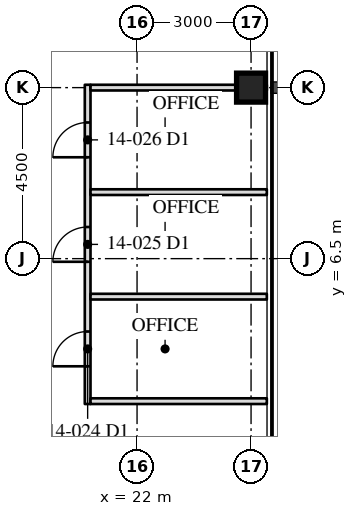
"""IFC4 building model, lengths in metres.
Left out: names, types, materials, properties, quantities, classifications, styles, units other than length and angle.
Written with IfcOpenShell. Run it as: python <this file> out.ifc"""

import sys

from ifc_helpers import new_model, si_unit, direction, frame, frame_2d, origin, origin_2d, place, context, subcontext, project, spatial, rectangle, hollow_rectangle, extrude, element, fill, save


model = new_model("IFC4")
c1 = context("Model", 3, precision=1e-05, world=origin(), true_north=direction((0.0, 1.0)))
c2 = subcontext(c1, "Body", "Model", "MODEL_VIEW")
j1 = project(units=[si_unit("LENGTHUNIT", "METRE"), si_unit("PLANEANGLEUNIT", "RADIAN")], contexts=[c1])
p1 = place(None, origin())
s1 = spatial("IfcSite", under=j1, at=p1, CompositionType="ELEMENT")
p2 = place(p1, origin())
s2 = spatial("IfcBuilding", under=s1, at=p2, CompositionType="ELEMENT")
p3 = place(p2, frame((0.0, 0.0, 61.1)))
s3 = spatial("IfcBuildingStorey", under=s2, at=p3, CompositionType="ELEMENT", Elevation=61.1)
p4 = place(p3, frame((25.0, 11.0, 0.0), z_axis=(0.0, 0.0, 1.0), x_axis=(0.0, 1.0, 0.0)))
e1 = element("IfcColumn", 1, at=p4, inside=s3, PredefinedType="COLUMN", context=c2, shape_type="SweptSolid", body=[
    extrude(hollow_rectangle(XDim=0.762, YDim=0.762, WallThickness=0.127, at=origin_2d()), origin(), (0.0, 0.0, 1.0), 4.1),
])
p5 = place(p3, frame((20.7, 2.675, 0.0), z_axis=(0.0, 0.0, 1.0), x_axis=(0.0, 1.0, 0.0)))
e2 = element("IfcWall", 2, at=p5, inside=s3, PredefinedType="PARTITIONING", context=c2, shape_type="SweptSolid", body=[
    extrude(rectangle(XDim=8.4, YDim=0.15, at=frame_2d((4.2, 0.0))), origin(), (0.0, 0.0, 1.0), 3.91),
])
p6 = place(p5, frame((0.992, 0.0, 0.0)))
e3 = element("IfcOpeningElement", 3, at=p6, cuts=e2, PredefinedType="OPENING", context=c2, shape_type="SweptSolid", body=[
    extrude(rectangle(XDim=0.915, YDim=2.134, at=frame_2d((0.458, 1.067))), frame((0.0, 0.085, 0.0), z_axis=(0.0, -1.0, 0.0), x_axis=(1.0, 0.0, 0.0)), (0.0, 0.0, 1.0), 0.17),
])
p7 = place(p5, frame((3.742, 0.0, 0.0)))
e4 = element("IfcOpeningElement", 4, at=p7, cuts=e2, PredefinedType="OPENING", context=c2, shape_type="SweptSolid", body=[
    extrude(rectangle(XDim=0.915, YDim=2.134, at=frame_2d((0.458, 1.067))), frame((0.0, 0.085, 0.0), z_axis=(0.0, -1.0, 0.0), x_axis=(1.0, 0.0, 0.0)), (0.0, 0.0, 1.0), 0.17),
])
p8 = place(p5, frame((6.492, 0.0, 0.0)))
e5 = element("IfcOpeningElement", 5, at=p8, cuts=e2, PredefinedType="OPENING", context=c2, shape_type="SweptSolid", body=[
    extrude(rectangle(XDim=0.915, YDim=2.134, at=frame_2d((0.458, 1.067))), frame((0.0, 0.085, 0.0), z_axis=(0.0, -1.0, 0.0), x_axis=(1.0, 0.0, 0.0)), (0.0, 0.0, 1.0), 0.17),
])
for number, where, z_axis, x_axis in (
    (6, (20.775, 2.75, 0.0), (0.0, 0.0, 1.0), (1.0, 0.0, 0.0)),
    (7, (20.775, 5.5, 0.0), (0.0, 0.0, 1.0), (1.0, 0.0, 0.0)),
    (8, (20.775, 8.25, 0.0), (0.0, 0.0, 1.0), (1.0, 0.0, 0.0)),
):
    element("IfcWall", number, at=place(p3, frame(where, z_axis=z_axis, x_axis=x_axis)), inside=s3, PredefinedType="PARTITIONING", context=c2, shape_type="SweptSolid", body=[
        extrude(rectangle(XDim=4.64, YDim=0.15, at=frame_2d((2.32, 0.0))), origin(), (0.0, 0.0, 1.0), 3.91),
    ])
p9 = place(p3, frame((20.775, 11.0, 0.0), z_axis=(0.0, 0.0, 1.0), x_axis=(1.0, 0.0, 0.0)))
e9 = element("IfcWall", 9, at=p9, inside=s3, PredefinedType="PARTITIONING", context=c2, shape_type="SweptSolid", body=[
    extrude(rectangle(XDim=4.64, YDim=0.15, at=frame_2d((2.32, 0.0))), origin(), (0.0, 0.0, 1.0), 3.13),
])
p10 = place(p6, origin())
e10 = element("IfcDoor", 10, at=p10, inside=s3, OperationType="SINGLE_SWING_LEFT", PredefinedType="DOOR", context=c2, shape_type="SweptSolid", body=[
    extrude(rectangle(XDim=0.915, YDim=2.134, at=frame_2d((0.458, 1.067))), frame((0.0, 0.025, 0.0), z_axis=(0.0, -1.0, 0.0), x_axis=(1.0, 0.0, 0.0)), (0.0, 0.0, 1.0), 0.05),
])
fill(e3, e10)
p11 = place(p7, origin())
e11 = element("IfcDoor", 11, at=p11, inside=s3, OperationType="SINGLE_SWING_LEFT", PredefinedType="DOOR", context=c2, shape_type="SweptSolid", body=[
    extrude(rectangle(XDim=0.915, YDim=2.134, at=frame_2d((0.458, 1.067))), frame((0.0, 0.025, 0.0), z_axis=(0.0, -1.0, 0.0), x_axis=(1.0, 0.0, 0.0)), (0.0, 0.0, 1.0), 0.05),
])
fill(e4, e11)
p12 = place(p8, origin())
e12 = element("IfcDoor", 12, at=p12, inside=s3, OperationType="SINGLE_SWING_LEFT", PredefinedType="DOOR", context=c2, shape_type="SweptSolid", body=[
    extrude(rectangle(XDim=0.915, YDim=2.134, at=frame_2d((0.458, 1.067))), frame((0.0, 0.025, 0.0), z_axis=(0.0, -1.0, 0.0), x_axis=(1.0, 0.0, 0.0)), (0.0, 0.0, 1.0), 0.05),
])
fill(e5, e12)
save(model, sys.argv[1])
